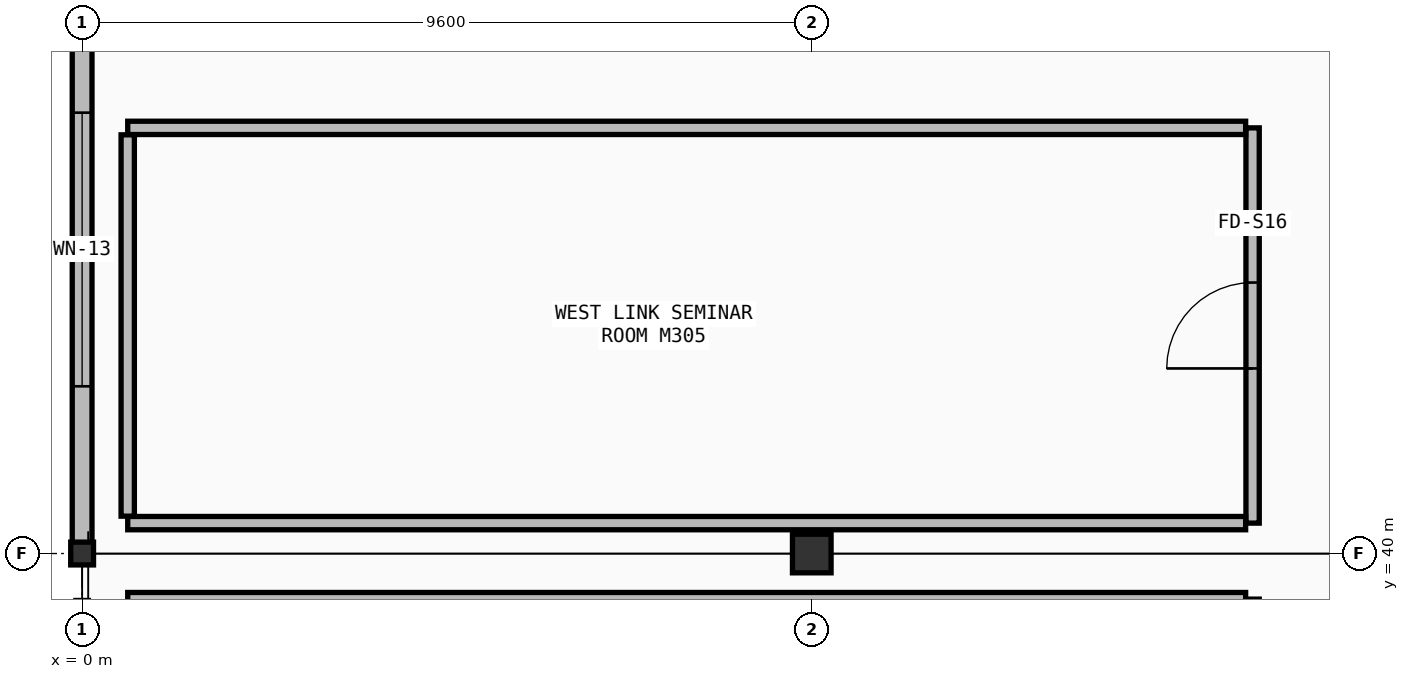
"""IFC4 building model, lengths in metres.
Left out: names, types, materials, properties, quantities, classifications, styles, units other than length and angle.
Written with IfcOpenShell. Run it as: python <this file> out.ifc"""

import sys

from ifc_helpers import new_model, si_unit, direction, frame, frame_2d, origin, origin_2d, place, context, subcontext, project, spatial, rectangle, hollow_circle, i_section, extrude, element, fill, save


model = new_model("IFC4")
c1 = context("Model", 3, precision=1e-05, world=origin(), true_north=direction((0.0, 1.0)))
c2 = subcontext(c1, "Body", "Model", "MODEL_VIEW")
j1 = project(units=[si_unit("LENGTHUNIT", "METRE"), si_unit("PLANEANGLEUNIT", "RADIAN")], contexts=[c1])
p1 = place(None, origin())
s1 = spatial("IfcSite", under=j1, at=p1, CompositionType="ELEMENT")
p2 = place(p1, origin())
s2 = spatial("IfcBuilding", under=s1, at=p2, CompositionType="ELEMENT")
p3 = place(p2, frame((0.0, 0.0, 15.9)))
s3 = spatial("IfcBuildingStorey", under=s2, at=p3, CompositionType="ELEMENT", Elevation=15.9)
p4 = place(p3, frame((0.0, 40.0, 0.0), z_axis=(0.0, 0.0, 1.0), x_axis=(1.0, 0.0, 0.0)))
e1 = element("IfcColumn", 1, at=p4, inside=s3, PredefinedType="COLUMN", context=c2, shape_type="SweptSolid", body=[
    extrude(i_section(OverallWidth=0.3, OverallDepth=0.3, WebThickness=0.011, FlangeThickness=0.019, FilletRadius=0.027, at=origin_2d()), origin(), (0.0, 0.0, 1.0), 4.5),
])
p5 = place(p3, frame((9.6, 40.0, 0.0), z_axis=(0.0, 0.0, 1.0), x_axis=(1.0, 0.0, 0.0)))
e2 = element("IfcColumn", 2, at=p5, inside=s3, PredefinedType="COLUMN", context=c2, shape_type="SweptSolid", body=[
    extrude(hollow_circle(Radius=0.254, WallThickness=0.025, at=origin_2d()), origin(), (0.0, 0.0, 1.0), 4.5),
])
p6 = place(p3, frame((0.0, 40.0, 0.0), z_axis=(0.0, 0.0, 1.0), x_axis=(0.0, 1.0, 0.0)))
e3 = element("IfcWall", 3, at=p6, inside=s3, PredefinedType="STANDARD", context=c2, shape_type="SweptSolid", body=[
    extrude(rectangle(XDim=8.0, YDim=0.26, at=frame_2d((4.0, 0.0))), origin(), (0.0, 0.0, 1.0), 3.355),
])
p7 = place(p6, frame((2.2, 0.0, 0.9)))
e4 = element("IfcOpeningElement", 4, at=p7, cuts=e3, PredefinedType="OPENING", context=c2, shape_type="SweptSolid", body=[
    extrude(rectangle(XDim=3.6, YDim=2.35, at=frame_2d((1.8, 1.175))), frame((0.0, 0.14, 0.0), z_axis=(0.0, -1.0, 0.0), x_axis=(1.0, 0.0, 0.0)), (0.0, 0.0, 1.0), 0.28),
])
p8 = place(p3, frame((15.309, 39.4, 0.0), z_axis=(0.0, 0.0, 1.0), x_axis=(-1.0, 0.0, 0.0)))
e5 = element("IfcWall", 5, at=p8, inside=s3, PredefinedType="PARTITIONING", context=c2, shape_type="SweptSolid", body=[
    extrude(rectangle(XDim=14.708, YDim=0.175, at=frame_2d((7.354, 0.0))), origin(), (0.0, 0.0, 1.0), 3.646),
])
p9 = place(p3, frame((15.4, 40.4, 0.0), z_axis=(0.0, 0.0, 1.0), x_axis=(0.0, 1.0, 0.0)))
e6 = element("IfcWall", 6, at=p9, inside=s3, PredefinedType="PARTITIONING", context=c2, shape_type="SweptSolid", body=[
    extrude(rectangle(XDim=5.2, YDim=0.175, at=frame_2d((2.6, 0.0))), origin(), (0.0, 0.0, 1.0), 3.835),
])
p10 = place(p9, frame((2.035, 0.0, 0.0)))
e7 = element("IfcOpeningElement", 7, at=p10, cuts=e6, PredefinedType="OPENING", context=c2, shape_type="SweptSolid", body=[
    extrude(rectangle(XDim=1.13, YDim=2.3, at=frame_2d((0.565, 1.15))), frame((0.0, 0.097, 0.0), z_axis=(0.0, -1.0, 0.0), x_axis=(1.0, 0.0, 0.0)), (0.0, 0.0, 1.0), 0.195),
])
for number, where, z_axis, x_axis in (
    (8, (0.6, 40.4, 0.0), (0.0, 0.0, 1.0), (1.0, 0.0, 0.0)),
    (9, (15.309, 45.6, 0.0), (0.0, 0.0, 1.0), (-1.0, 0.0, 0.0)),
):
    element("IfcWall", number, at=place(p3, frame(where, z_axis=z_axis, x_axis=x_axis)), inside=s3, PredefinedType="PARTITIONING", context=c2, shape_type="SweptSolid", body=[
        extrude(rectangle(XDim=14.708, YDim=0.175, at=frame_2d((7.354, 0.0))), origin(), (0.0, 0.0, 1.0), 3.255),
    ])
p11 = place(p3, frame((0.6, 45.509, 0.0), z_axis=(0.0, 0.0, 1.0), x_axis=(0.0, -1.0, 0.0)))
e10 = element("IfcWall", 10, at=p11, inside=s3, PredefinedType="PARTITIONING", context=c2, shape_type="SweptSolid", body=[
    extrude(rectangle(XDim=5.017, YDim=0.175, at=frame_2d((2.509, 0.0))), origin(), (0.0, 0.0, 1.0), 3.835),
])
p12 = place(p7, origin())
e11 = element("IfcWindow", 11, at=p12, inside=s3, PartitioningType="SINGLE_PANEL", PredefinedType="WINDOW", context=c2, shape_type="SweptSolid", body=[
    extrude(rectangle(XDim=3.6, YDim=2.35, at=frame_2d((1.8, 1.175))), frame((0.0, 0.03, 0.0), z_axis=(0.0, -1.0, 0.0), x_axis=(1.0, 0.0, 0.0)), (0.0, 0.0, 1.0), 0.06),
])
fill(e4, e11)
p13 = place(p10, origin())
e12 = element("IfcDoor", 12, at=p13, inside=s3, OperationType="SINGLE_SWING_LEFT", PredefinedType="DOOR", context=c2, shape_type="SweptSolid", body=[
    extrude(rectangle(XDim=1.13, YDim=2.3, at=frame_2d((0.565, 1.15))), frame((0.0, 0.025, 0.0), z_axis=(0.0, -1.0, 0.0), x_axis=(1.0, 0.0, 0.0)), (0.0, 0.0, 1.0), 0.05),
])
fill(e7, e12)
save(model, sys.argv[1])
